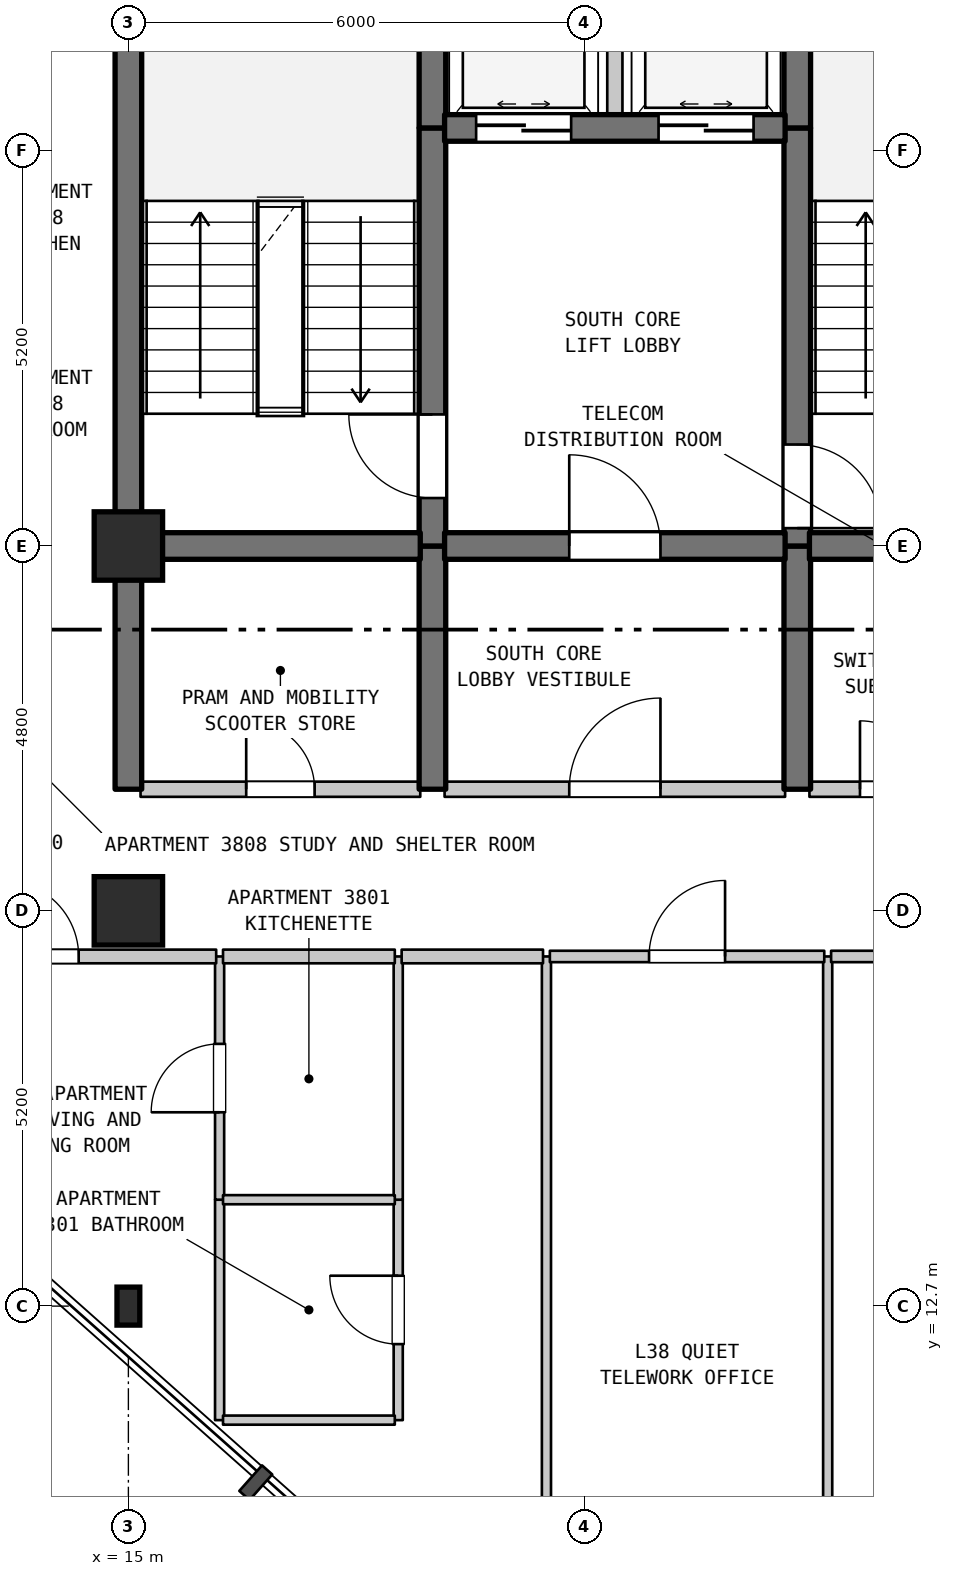
"""IFC4 building model, lengths in metres.
Left out: names, types, materials, properties, quantities, classifications, styles, units other than length and angle.
Written with IfcOpenShell. Run it as: python <this file> out.ifc"""

import sys

from ifc_helpers import new_model, si_unit, direction, frame, frame_2d, origin, origin_2d, place, context, subcontext, project, spatial, rectangle, i_section, extrude, element, fill, save


model = new_model("IFC4")
c1 = context("Model", 3, precision=1e-05, world=origin(), true_north=direction((0.0, 1.0)))
c2 = subcontext(c1, "Body", "Model", "MODEL_VIEW")
j1 = project(units=[si_unit("LENGTHUNIT", "METRE"), si_unit("PLANEANGLEUNIT", "RADIAN")], contexts=[c1])
p1 = place(None, origin())
s1 = spatial("IfcSite", under=j1, at=p1, CompositionType="ELEMENT")
p2 = place(p1, origin())
s2 = spatial("IfcBuilding", under=s1, at=p2, CompositionType="ELEMENT")
p3 = place(p2, frame((0.0, 0.0, 155.7)))
s3 = spatial("IfcBuildingStorey", under=s2, at=p3, CompositionType="ELEMENT", Elevation=155.7)
p4 = place(p3, frame((15.0, 12.7, 0.0), z_axis=(0.0, 0.0, 1.0), x_axis=(1.0, 0.0, 0.0)))
e1 = element("IfcColumn", 1, at=p4, inside=s3, PredefinedType="COLUMN", context=c2, shape_type="SweptSolid", body=[
    extrude(i_section(OverallWidth=0.3, OverallDepth=0.5, WebThickness=0.014, FlangeThickness=0.028, FilletRadius=0.027, at=origin_2d()), origin(), (0.0, 0.0, 1.0), 3.7),
])
for number, where, z_axis, x_axis in (
    (2, (15.0, 17.9, 0.0), (0.0, 0.0, 1.0), (1.0, 0.0, 0.0)),
    (3, (15.0, 22.7, 0.0), (0.0, 0.0, 1.0), (1.0, 0.0, 0.0)),
):
    element("IfcColumn", number, at=place(p3, frame(where, z_axis=z_axis, x_axis=x_axis)), inside=s3, PredefinedType="COLUMN", context=c2, shape_type="SweptSolid", body=[
        extrude(rectangle(XDim=0.9, YDim=0.9, at=origin_2d()), origin(), (0.0, 0.0, 1.0), 3.7),
    ])
p5 = place(p3, frame((15.0, 19.5, 0.0), z_axis=(0.0, 0.0, 1.0), x_axis=(0.0, 1.0, 0.0)))
e4 = element("IfcWall", 4, at=p5, inside=s3, PredefinedType="SHEAR", context=c2, shape_type="SweptSolid", body=[
    extrude(rectangle(XDim=3.2, YDim=0.35, at=frame_2d((1.6, 0.0))), origin(), (0.0, 0.0, 1.0), 3.28),
])
p6 = place(p3, frame((15.0, 22.7, 0.0), z_axis=(0.0, 0.0, 1.0), x_axis=(0.0, 1.0, 0.0)))
e5 = element("IfcWall", 5, at=p6, inside=s3, PredefinedType="SHEAR", context=c2, shape_type="SweptSolid", body=[
    extrude(rectangle(XDim=6.8, YDim=0.35, at=frame_2d((3.4, 0.0))), origin(), (0.0, 0.0, 1.0), 3.28),
])
p7 = place(p3, frame((16.2, 11.2, 0.0), z_axis=(0.0, 0.0, 1.0), x_axis=(0.0, 1.0, 0.0)))
e6 = element("IfcWall", 6, at=p7, inside=s3, PredefinedType="PARTITIONING", context=c2, shape_type="SweptSolid", body=[
    extrude(rectangle(XDim=2.9, YDim=0.12, at=frame_2d((1.45, 0.0))), origin(), (0.0, 0.0, 1.0), 3.28),
])
p8 = place(p3, frame((16.2, 14.1, 0.0), z_axis=(0.0, 0.0, 1.0), x_axis=(0.0, 1.0, 0.0)))
e7 = element("IfcWall", 7, at=p8, inside=s3, PredefinedType="PARTITIONING", context=c2, shape_type="SweptSolid", body=[
    extrude(rectangle(XDim=3.2, YDim=0.12, at=frame_2d((1.6, 0.0))), origin(), (0.0, 0.0, 1.0), 3.28),
])
p9 = place(p8, frame((1.15, 0.0, 0.0)))
e8 = element("IfcOpeningElement", 8, at=p9, cuts=e7, PredefinedType="OPENING", context=c2, shape_type="SweptSolid", body=[
    extrude(rectangle(XDim=0.9, YDim=2.15, at=frame_2d((0.45, 1.075))), frame((0.0, 0.07, 0.0), z_axis=(0.0, -1.0, 0.0), x_axis=(1.0, 0.0, 0.0)), (0.0, 0.0, 1.0), 0.14),
])
p10 = place(p3, frame((18.55, 11.2, 0.0), z_axis=(0.0, 0.0, 1.0), x_axis=(0.0, 1.0, 0.0)))
e9 = element("IfcWall", 9, at=p10, inside=s3, PredefinedType="PARTITIONING", context=c2, shape_type="SweptSolid", body=[
    extrude(rectangle(XDim=2.9, YDim=0.12, at=frame_2d((1.45, 0.0))), origin(), (0.0, 0.0, 1.0), 3.28),
])
p11 = place(p10, frame((1.0, 0.0, 0.0)))
e10 = element("IfcOpeningElement", 10, at=p11, cuts=e9, PredefinedType="OPENING", context=c2, shape_type="SweptSolid", body=[
    extrude(rectangle(XDim=0.9, YDim=2.1, at=frame_2d((0.45, 1.05))), frame((0.0, 0.07, 0.0), z_axis=(0.0, -1.0, 0.0), x_axis=(1.0, 0.0, 0.0)), (0.0, 0.0, 1.0), 0.14),
])
p12 = place(p3, frame((18.55, 14.1, 0.0), z_axis=(0.0, 0.0, 1.0), x_axis=(0.0, 1.0, 0.0)))
e11 = element("IfcWall", 11, at=p12, inside=s3, PredefinedType="PARTITIONING", context=c2, shape_type="SweptSolid", body=[
    extrude(rectangle(XDim=3.2, YDim=0.12, at=frame_2d((1.6, 0.0))), origin(), (0.0, 0.0, 1.0), 3.28),
])
p13 = place(p3, frame((19.0, 19.5, 0.0), z_axis=(0.0, 0.0, 1.0), x_axis=(0.0, 1.0, 0.0)))
e12 = element("IfcWall", 12, at=p13, inside=s3, PredefinedType="SHEAR", context=c2, shape_type="SweptSolid", body=[
    extrude(rectangle(XDim=3.2, YDim=0.35, at=frame_2d((1.6, 0.0))), origin(), (0.0, 0.0, 1.0), 3.28),
])
p14 = place(p3, frame((19.0, 22.7, 0.0), z_axis=(0.0, 0.0, 1.0), x_axis=(0.0, 1.0, 0.0)))
e13 = element("IfcWall", 13, at=p14, inside=s3, PredefinedType="SHEAR", context=c2, shape_type="SweptSolid", body=[
    extrude(rectangle(XDim=5.5, YDim=0.35, at=frame_2d((2.75, 0.0))), origin(), (0.0, 0.0, 1.0), 3.28),
])
p15 = place(p14, frame((0.631, 0.0, 0.0)))
e14 = element("IfcOpeningElement", 14, at=p15, cuts=e13, PredefinedType="OPENING", context=c2, shape_type="SweptSolid", body=[
    extrude(rectangle(XDim=1.1, YDim=2.15, at=frame_2d((0.55, 1.075))), frame((0.0, 0.185, 0.0), z_axis=(0.0, -1.0, 0.0), x_axis=(1.0, 0.0, 0.0)), (0.0, 0.0, 1.0), 0.37),
])
p16 = place(p3, frame((19.0, 28.2, 0.0), z_axis=(0.0, 0.0, 1.0), x_axis=(0.0, 1.0, 0.0)))
e15 = element("IfcWall", 15, at=p16, inside=s3, PredefinedType="SHEAR", context=c2, shape_type="SweptSolid", body=[
    extrude(rectangle(XDim=1.3, YDim=0.35, at=frame_2d((0.65, 0.0))), origin(), (0.0, 0.0, 1.0), 3.28),
])
p17 = place(p3, frame((20.5, 7.154, 0.0), z_axis=(0.0, 0.0, 1.0), x_axis=(0.0, 1.0, 0.0)))
e16 = element("IfcWall", 16, at=p17, inside=s3, PredefinedType="PARTITIONING", context=c2, shape_type="SweptSolid", body=[
    extrude(rectangle(XDim=10.146, YDim=0.12, at=frame_2d((5.073, 0.0))), origin(), (0.0, 0.0, 1.0), 3.28),
])
p18 = place(p3, frame((21.4, 28.2, 0.0), z_axis=(0.0, 0.0, 1.0), x_axis=(0.0, 1.0, 0.0)))
e17 = element("IfcWall", 17, at=p18, inside=s3, PredefinedType="STANDARD", context=c2, shape_type="SweptSolid", body=[
    extrude(rectangle(XDim=2.6, YDim=0.2, at=frame_2d((1.3, 0.0))), origin(), (0.0, 0.0, 1.0), 3.28),
])
p19 = place(p3, frame((23.8, 19.5, 0.0), z_axis=(0.0, 0.0, 1.0), x_axis=(0.0, 1.0, 0.0)))
e18 = element("IfcWall", 18, at=p19, inside=s3, PredefinedType="SHEAR", context=c2, shape_type="SweptSolid", body=[
    extrude(rectangle(XDim=3.2, YDim=0.35, at=frame_2d((1.6, 0.0))), origin(), (0.0, 0.0, 1.0), 3.28),
])
p20 = place(p3, frame((23.8, 22.7, 0.0), z_axis=(0.0, 0.0, 1.0), x_axis=(0.0, 1.0, 0.0)))
e19 = element("IfcWall", 19, at=p20, inside=s3, PredefinedType="SHEAR", context=c2, shape_type="SweptSolid", body=[
    extrude(rectangle(XDim=5.5, YDim=0.35, at=frame_2d((2.75, 0.0))), origin(), (0.0, 0.0, 1.0), 3.28),
])
p21 = place(p20, frame((0.235, 0.0, 0.0)))
e20 = element("IfcOpeningElement", 20, at=p21, cuts=e19, PredefinedType="OPENING", context=c2, shape_type="SweptSolid", body=[
    extrude(rectangle(XDim=1.1, YDim=2.15, at=frame_2d((0.55, 1.075))), frame((0.0, 0.185, 0.0), z_axis=(0.0, -1.0, 0.0), x_axis=(1.0, 0.0, 0.0)), (0.0, 0.0, 1.0), 0.37),
])
p22 = place(p3, frame((23.8, 28.2, 0.0), z_axis=(0.0, 0.0, 1.0), x_axis=(0.0, 1.0, 0.0)))
e21 = element("IfcWall", 21, at=p22, inside=s3, PredefinedType="SHEAR", context=c2, shape_type="SweptSolid", body=[
    extrude(rectangle(XDim=1.3, YDim=0.35, at=frame_2d((0.65, 0.0))), origin(), (0.0, 0.0, 1.0), 3.28),
])
p23 = place(p3, frame((24.2, 0.71, 0.0), z_axis=(0.0, 0.0, 1.0), x_axis=(0.0, 1.0, 0.0)))
e22 = element("IfcWall", 22, at=p23, inside=s3, PredefinedType="PARTITIONING", context=c2, shape_type="SweptSolid", body=[
    extrude(rectangle(XDim=16.59, YDim=0.12, at=frame_2d((8.295, 0.0))), origin(), (0.0, 0.0, 1.0), 3.28),
])
for number, where, z_axis, x_axis in (
    (23, (16.245, 11.2, 0.0), (0.0, 0.0, 1.0), (1.0, 0.0, 0.0)),
    (24, (16.245, 14.1, 0.0), (0.0, 0.0, 1.0), (1.0, 0.0, 0.0)),
):
    element("IfcWall", number, at=place(p3, frame(where, z_axis=z_axis, x_axis=x_axis)), inside=s3, PredefinedType="PARTITIONING", context=c2, shape_type="SweptSolid", body=[
        extrude(rectangle(XDim=2.26, YDim=0.12, at=frame_2d((1.13, 0.0))), origin(), (0.0, 0.0, 1.0), 3.28),
    ])
p24 = place(p3, frame((12.875, 17.3, 0.0), z_axis=(0.0, 0.0, 1.0), x_axis=(1.0, 0.0, 0.0)))
e25 = element("IfcWall", 25, at=p24, inside=s3, PredefinedType="STANDARD", context=c2, shape_type="SweptSolid", body=[
    extrude(rectangle(XDim=3.28, YDim=0.18, at=frame_2d((1.64, 0.0))), origin(), (0.0, 0.0, 1.0), 3.28),
])
p25 = place(p24, frame((0.471, 0.0, 0.0)))
e26 = element("IfcOpeningElement", 26, at=p25, cuts=e25, PredefinedType="OPENING", context=c2, shape_type="SweptSolid", body=[
    extrude(rectangle(XDim=1.0, YDim=2.15, at=frame_2d((0.5, 1.075))), frame((0.0, 0.1, 0.0), z_axis=(0.0, -1.0, 0.0), x_axis=(1.0, 0.0, 0.0)), (0.0, 0.0, 1.0), 0.2),
])
p26 = place(p3, frame((16.245, 17.3, 0.0), z_axis=(0.0, 0.0, 1.0), x_axis=(1.0, 0.0, 0.0)))
e27 = element("IfcWall", 27, at=p26, inside=s3, PredefinedType="STANDARD", context=c2, shape_type="SweptSolid", body=[
    extrude(rectangle(XDim=2.26, YDim=0.18, at=frame_2d((1.13, 0.0))), origin(), (0.0, 0.0, 1.0), 3.28),
])
p27 = place(p3, frame((18.595, 17.3, 0.0), z_axis=(0.0, 0.0, 1.0), x_axis=(1.0, 0.0, 0.0)))
e28 = element("IfcWall", 28, at=p27, inside=s3, PredefinedType="STANDARD", context=c2, shape_type="SweptSolid", body=[
    extrude(rectangle(XDim=1.86, YDim=0.18, at=frame_2d((0.93, 0.0))), origin(), (0.0, 0.0, 1.0), 3.28),
])
p28 = place(p3, frame((20.545, 17.3, 0.0), z_axis=(0.0, 0.0, 1.0), x_axis=(1.0, 0.0, 0.0)))
e29 = element("IfcWall", 29, at=p28, inside=s3, PredefinedType="STANDARD", context=c2, shape_type="SweptSolid", body=[
    extrude(rectangle(XDim=3.61, YDim=0.15, at=frame_2d((1.805, 0.0))), origin(), (0.0, 0.0, 1.0), 3.28),
])
p29 = place(p28, frame((1.305, 0.0, 0.0)))
e30 = element("IfcOpeningElement", 30, at=p29, cuts=e29, PredefinedType="OPENING", context=c2, shape_type="SweptSolid", body=[
    extrude(rectangle(XDim=1.0, YDim=2.15, at=frame_2d((0.5, 1.075))), frame((0.0, 0.085, 0.0), z_axis=(0.0, -1.0, 0.0), x_axis=(1.0, 0.0, 0.0)), (0.0, 0.0, 1.0), 0.17),
])
p30 = place(p3, frame((24.245, 17.3, 0.0), z_axis=(0.0, 0.0, 1.0), x_axis=(1.0, 0.0, 0.0)))
e31 = element("IfcWall", 31, at=p30, inside=s3, PredefinedType="STANDARD", context=c2, shape_type="SweptSolid", body=[
    extrude(rectangle(XDim=4.71, YDim=0.15, at=frame_2d((2.355, 0.0))), origin(), (0.0, 0.0, 1.0), 3.28),
])
p31 = place(p30, frame((1.782, 0.0, 0.0)))
e32 = element("IfcOpeningElement", 32, at=p31, cuts=e31, PredefinedType="OPENING", context=c2, shape_type="SweptSolid", body=[
    extrude(rectangle(XDim=1.0, YDim=2.15, at=frame_2d((0.5, 1.075))), frame((0.0, 0.085, 0.0), z_axis=(0.0, -1.0, 0.0), x_axis=(1.0, 0.0, 0.0)), (0.0, 0.0, 1.0), 0.17),
])
p32 = place(p3, frame((15.16, 19.5, 0.0), z_axis=(0.0, 0.0, 1.0), x_axis=(1.0, 0.0, 0.0)))
e33 = element("IfcWall", 33, at=p32, inside=s3, PredefinedType="STANDARD", context=c2, shape_type="SweptSolid", body=[
    extrude(rectangle(XDim=3.68, YDim=0.2, at=frame_2d((1.84, 0.0))), origin(), (0.0, 0.0, 1.0), 3.28),
])
p33 = place(p32, frame((1.39, 0.0, 0.0)))
e34 = element("IfcOpeningElement", 34, at=p33, cuts=e33, PredefinedType="OPENING", context=c2, shape_type="SweptSolid", body=[
    extrude(rectangle(XDim=0.9, YDim=2.15, at=frame_2d((0.45, 1.075))), frame((0.0, 0.11, 0.0), z_axis=(0.0, -1.0, 0.0), x_axis=(1.0, 0.0, 0.0)), (0.0, 0.0, 1.0), 0.22),
])
p34 = place(p3, frame((19.16, 19.5, 0.0), z_axis=(0.0, 0.0, 1.0), x_axis=(1.0, 0.0, 0.0)))
e35 = element("IfcWall", 35, at=p34, inside=s3, PredefinedType="STANDARD", context=c2, shape_type="SweptSolid", body=[
    extrude(rectangle(XDim=4.48, YDim=0.2, at=frame_2d((2.24, 0.0))), origin(), (0.0, 0.0, 1.0), 3.28),
])
p35 = place(p34, frame((1.64, 0.0, 0.0)))
e36 = element("IfcOpeningElement", 36, at=p35, cuts=e35, PredefinedType="OPENING", context=c2, shape_type="SweptSolid", body=[
    extrude(rectangle(XDim=1.2, YDim=2.2, at=frame_2d((0.6, 1.1))), frame((0.0, 0.11, 0.0), z_axis=(0.0, -1.0, 0.0), x_axis=(1.0, 0.0, 0.0)), (0.0, 0.0, 1.0), 0.22),
])
p36 = place(p3, frame((23.96, 19.5, 0.0), z_axis=(0.0, 0.0, 1.0), x_axis=(1.0, 0.0, 0.0)))
e37 = element("IfcWall", 37, at=p36, inside=s3, PredefinedType="STANDARD", context=c2, shape_type="SweptSolid", body=[
    extrude(rectangle(XDim=4.455, YDim=0.2, at=frame_2d((2.228, 0.0))), origin(), (0.0, 0.0, 1.0), 3.28),
])
p37 = place(p36, frame((0.665, 0.0, 0.0)))
e38 = element("IfcOpeningElement", 38, at=p37, cuts=e37, PredefinedType="OPENING", context=c2, shape_type="SweptSolid", body=[
    extrude(rectangle(XDim=0.9, YDim=2.15, at=frame_2d((0.45, 1.075))), frame((0.0, 0.11, 0.0), z_axis=(0.0, -1.0, 0.0), x_axis=(1.0, 0.0, 0.0)), (0.0, 0.0, 1.0), 0.22),
])
p38 = place(p36, frame((2.791, 0.0, 0.0)))
e39 = element("IfcOpeningElement", 39, at=p38, cuts=e37, PredefinedType="OPENING", context=c2, shape_type="SweptSolid", body=[
    extrude(rectangle(XDim=0.9, YDim=2.15, at=frame_2d((0.45, 1.075))), frame((0.0, 0.11, 0.0), z_axis=(0.0, -1.0, 0.0), x_axis=(1.0, 0.0, 0.0)), (0.0, 0.0, 1.0), 0.22),
])
p39 = place(p3, frame((15.16, 22.7, 0.0), z_axis=(0.0, 0.0, 1.0), x_axis=(1.0, 0.0, 0.0)))
e40 = element("IfcWall", 40, at=p39, inside=s3, PredefinedType="SHEAR", context=c2, shape_type="SweptSolid", body=[
    extrude(rectangle(XDim=3.68, YDim=0.35, at=frame_2d((1.84, 0.0))), origin(), (0.0, 0.0, 1.0), 3.28),
])
p40 = place(p3, frame((19.16, 22.7, 0.0), z_axis=(0.0, 0.0, 1.0), x_axis=(1.0, 0.0, 0.0)))
e41 = element("IfcWall", 41, at=p40, inside=s3, PredefinedType="SHEAR", context=c2, shape_type="SweptSolid", body=[
    extrude(rectangle(XDim=4.48, YDim=0.35, at=frame_2d((2.24, 0.0))), origin(), (0.0, 0.0, 1.0), 3.28),
])
p41 = place(p40, frame((1.64, 0.0, 0.0)))
e42 = element("IfcOpeningElement", 42, at=p41, cuts=e41, PredefinedType="OPENING", context=c2, shape_type="SweptSolid", body=[
    extrude(rectangle(XDim=1.2, YDim=2.2, at=frame_2d((0.6, 1.1))), frame((0.0, 0.185, 0.0), z_axis=(0.0, -1.0, 0.0), x_axis=(1.0, 0.0, 0.0)), (0.0, 0.0, 1.0), 0.37),
])
p42 = place(p3, frame((23.96, 22.7, 0.0), z_axis=(0.0, 0.0, 1.0), x_axis=(1.0, 0.0, 0.0)))
e43 = element("IfcWall", 43, at=p42, inside=s3, PredefinedType="SHEAR", context=c2, shape_type="SweptSolid", body=[
    extrude(rectangle(XDim=3.18, YDim=0.35, at=frame_2d((1.59, 0.0))), origin(), (0.0, 0.0, 1.0), 3.28),
])
p43 = place(p3, frame((19.16, 28.2, 0.0), z_axis=(0.0, 0.0, 1.0), x_axis=(1.0, 0.0, 0.0)))
e44 = element("IfcWall", 44, at=p43, inside=s3, PredefinedType="SHEAR", context=c2, shape_type="SweptSolid", body=[
    extrude(rectangle(XDim=4.48, YDim=0.35, at=frame_2d((2.24, 0.0))), origin(), (0.0, 0.0, 1.0), 3.28),
])
p44 = place(p43, frame((0.415, 0.0, 0.0)))
e45 = element("IfcOpeningElement", 45, at=p44, cuts=e44, PredefinedType="OPENING", context=c2, shape_type="SweptSolid", body=[
    extrude(rectangle(XDim=1.25, YDim=2.2, at=frame_2d((0.625, 1.1))), frame((0.0, 0.185, 0.0), z_axis=(0.0, -1.0, 0.0), x_axis=(1.0, 0.0, 0.0)), (0.0, 0.0, 1.0), 0.37),
])
p45 = place(p43, frame((2.815, 0.0, 0.0)))
e46 = element("IfcOpeningElement", 46, at=p45, cuts=e44, PredefinedType="OPENING", context=c2, shape_type="SweptSolid", body=[
    extrude(rectangle(XDim=1.25, YDim=2.2, at=frame_2d((0.625, 1.1))), frame((0.0, 0.185, 0.0), z_axis=(0.0, -1.0, 0.0), x_axis=(1.0, 0.0, 0.0)), (0.0, 0.0, 1.0), 0.37),
])
p46 = place(p9, origin())
e47 = element("IfcDoor", 47, at=p46, inside=s3, OperationType="SINGLE_SWING_LEFT", PredefinedType="DOOR", context=c2, shape_type="SweptSolid", body=[
    extrude(rectangle(XDim=0.9, YDim=2.15, at=frame_2d((0.45, 1.075))), frame((0.0, 0.025, 0.0), z_axis=(0.0, -1.0, 0.0), x_axis=(1.0, 0.0, 0.0)), (0.0, 0.0, 1.0), 0.05),
])
fill(e8, e47)
p47 = place(p11, origin())
e48 = element("IfcDoor", 48, at=p47, inside=s3, OperationType="SINGLE_SWING_RIGHT", PredefinedType="DOOR", context=c2, shape_type="SweptSolid", body=[
    extrude(rectangle(XDim=0.9, YDim=2.1, at=frame_2d((0.45, 1.05))), frame((0.0, 0.025, 0.0), z_axis=(0.0, -1.0, 0.0), x_axis=(1.0, 0.0, 0.0)), (0.0, 0.0, 1.0), 0.05),
])
fill(e10, e48)
p48 = place(p15, origin())
e49 = element("IfcDoor", 49, at=p48, inside=s3, OperationType="SINGLE_SWING_RIGHT", PredefinedType="DOOR", context=c2, shape_type="SweptSolid", body=[
    extrude(rectangle(XDim=1.1, YDim=2.15, at=frame_2d((0.55, 1.075))), frame((0.0, 0.025, 0.0), z_axis=(0.0, -1.0, 0.0), x_axis=(1.0, 0.0, 0.0)), (0.0, 0.0, 1.0), 0.05),
])
fill(e14, e49)
p49 = place(p21, frame((1.1, 0.0, 0.0), z_axis=(0.0, 0.0, 1.0), x_axis=(-1.0, 0.0, 0.0)))
e50 = element("IfcDoor", 50, at=p49, inside=s3, OperationType="SINGLE_SWING_LEFT", PredefinedType="DOOR", context=c2, shape_type="SweptSolid", body=[
    extrude(rectangle(XDim=1.1, YDim=2.15, at=frame_2d((0.55, 1.075))), frame((0.0, 0.025, 0.0), z_axis=(0.0, -1.0, 0.0), x_axis=(1.0, 0.0, 0.0)), (0.0, 0.0, 1.0), 0.05),
])
fill(e20, e50)
p50 = place(p25, origin())
e51 = element("IfcDoor", 51, at=p50, inside=s3, OperationType="SINGLE_SWING_LEFT", PredefinedType="DOOR", context=c2, shape_type="SweptSolid", body=[
    extrude(rectangle(XDim=1.0, YDim=2.15, at=frame_2d((0.5, 1.075))), frame((0.0, 0.025, 0.0), z_axis=(0.0, -1.0, 0.0), x_axis=(1.0, 0.0, 0.0)), (0.0, 0.0, 1.0), 0.05),
])
fill(e26, e51)
p51 = place(p29, origin())
e52 = element("IfcDoor", 52, at=p51, inside=s3, OperationType="SINGLE_SWING_RIGHT", PredefinedType="DOOR", context=c2, shape_type="SweptSolid", body=[
    extrude(rectangle(XDim=1.0, YDim=2.15, at=frame_2d((0.5, 1.075))), frame((0.0, 0.025, 0.0), z_axis=(0.0, -1.0, 0.0), x_axis=(1.0, 0.0, 0.0)), (0.0, 0.0, 1.0), 0.05),
])
fill(e30, e52)
p52 = place(p33, origin())
e53 = element("IfcDoor", 53, at=p52, inside=s3, OperationType="SINGLE_SWING_LEFT", PredefinedType="DOOR", context=c2, shape_type="SweptSolid", body=[
    extrude(rectangle(XDim=0.9, YDim=2.15, at=frame_2d((0.45, 1.075))), frame((0.0, 0.025, 0.0), z_axis=(0.0, -1.0, 0.0), x_axis=(1.0, 0.0, 0.0)), (0.0, 0.0, 1.0), 0.05),
])
fill(e34, e53)
p53 = place(p35, origin())
e54 = element("IfcDoor", 54, at=p53, inside=s3, OperationType="SINGLE_SWING_RIGHT", PredefinedType="DOOR", context=c2, shape_type="SweptSolid", body=[
    extrude(rectangle(XDim=1.2, YDim=2.2, at=frame_2d((0.6, 1.1))), frame((0.0, 0.025, 0.0), z_axis=(0.0, -1.0, 0.0), x_axis=(1.0, 0.0, 0.0)), (0.0, 0.0, 1.0), 0.05),
])
fill(e36, e54)
p54 = place(p37, origin())
e55 = element("IfcDoor", 55, at=p54, inside=s3, OperationType="SINGLE_SWING_LEFT", PredefinedType="DOOR", context=c2, shape_type="SweptSolid", body=[
    extrude(rectangle(XDim=0.9, YDim=2.15, at=frame_2d((0.45, 1.075))), frame((0.0, 0.025, 0.0), z_axis=(0.0, -1.0, 0.0), x_axis=(1.0, 0.0, 0.0)), (0.0, 0.0, 1.0), 0.05),
])
fill(e38, e55)
p55 = place(p41, origin())
e56 = element("IfcDoor", 56, at=p55, inside=s3, OperationType="SINGLE_SWING_LEFT", PredefinedType="DOOR", context=c2, shape_type="SweptSolid", body=[
    extrude(rectangle(XDim=1.2, YDim=2.2, at=frame_2d((0.6, 1.1))), frame((0.0, 0.025, 0.0), z_axis=(0.0, -1.0, 0.0), x_axis=(1.0, 0.0, 0.0)), (0.0, 0.0, 1.0), 0.05),
])
fill(e42, e56)
p56 = place(p44, origin())
e57 = element("IfcDoor", 57, at=p56, inside=s3, OperationType="DOUBLE_DOOR_SLIDING", PredefinedType="DOOR", context=c2, shape_type="SweptSolid", body=[
    extrude(rectangle(XDim=1.25, YDim=2.2, at=frame_2d((0.625, 1.1))), frame((0.0, 0.025, 0.0), z_axis=(0.0, -1.0, 0.0), x_axis=(1.0, 0.0, 0.0)), (0.0, 0.0, 1.0), 0.05),
])
fill(e45, e57)
p57 = place(p45, origin())
e58 = element("IfcDoor", 58, at=p57, inside=s3, OperationType="DOUBLE_DOOR_SLIDING", PredefinedType="DOOR", context=c2, shape_type="SweptSolid", body=[
    extrude(rectangle(XDim=1.25, YDim=2.2, at=frame_2d((0.625, 1.1))), frame((0.0, 0.025, 0.0), z_axis=(0.0, -1.0, 0.0), x_axis=(1.0, 0.0, 0.0)), (0.0, 0.0, 1.0), 0.05),
])
fill(e46, e58)
save(model, sys.argv[1])
